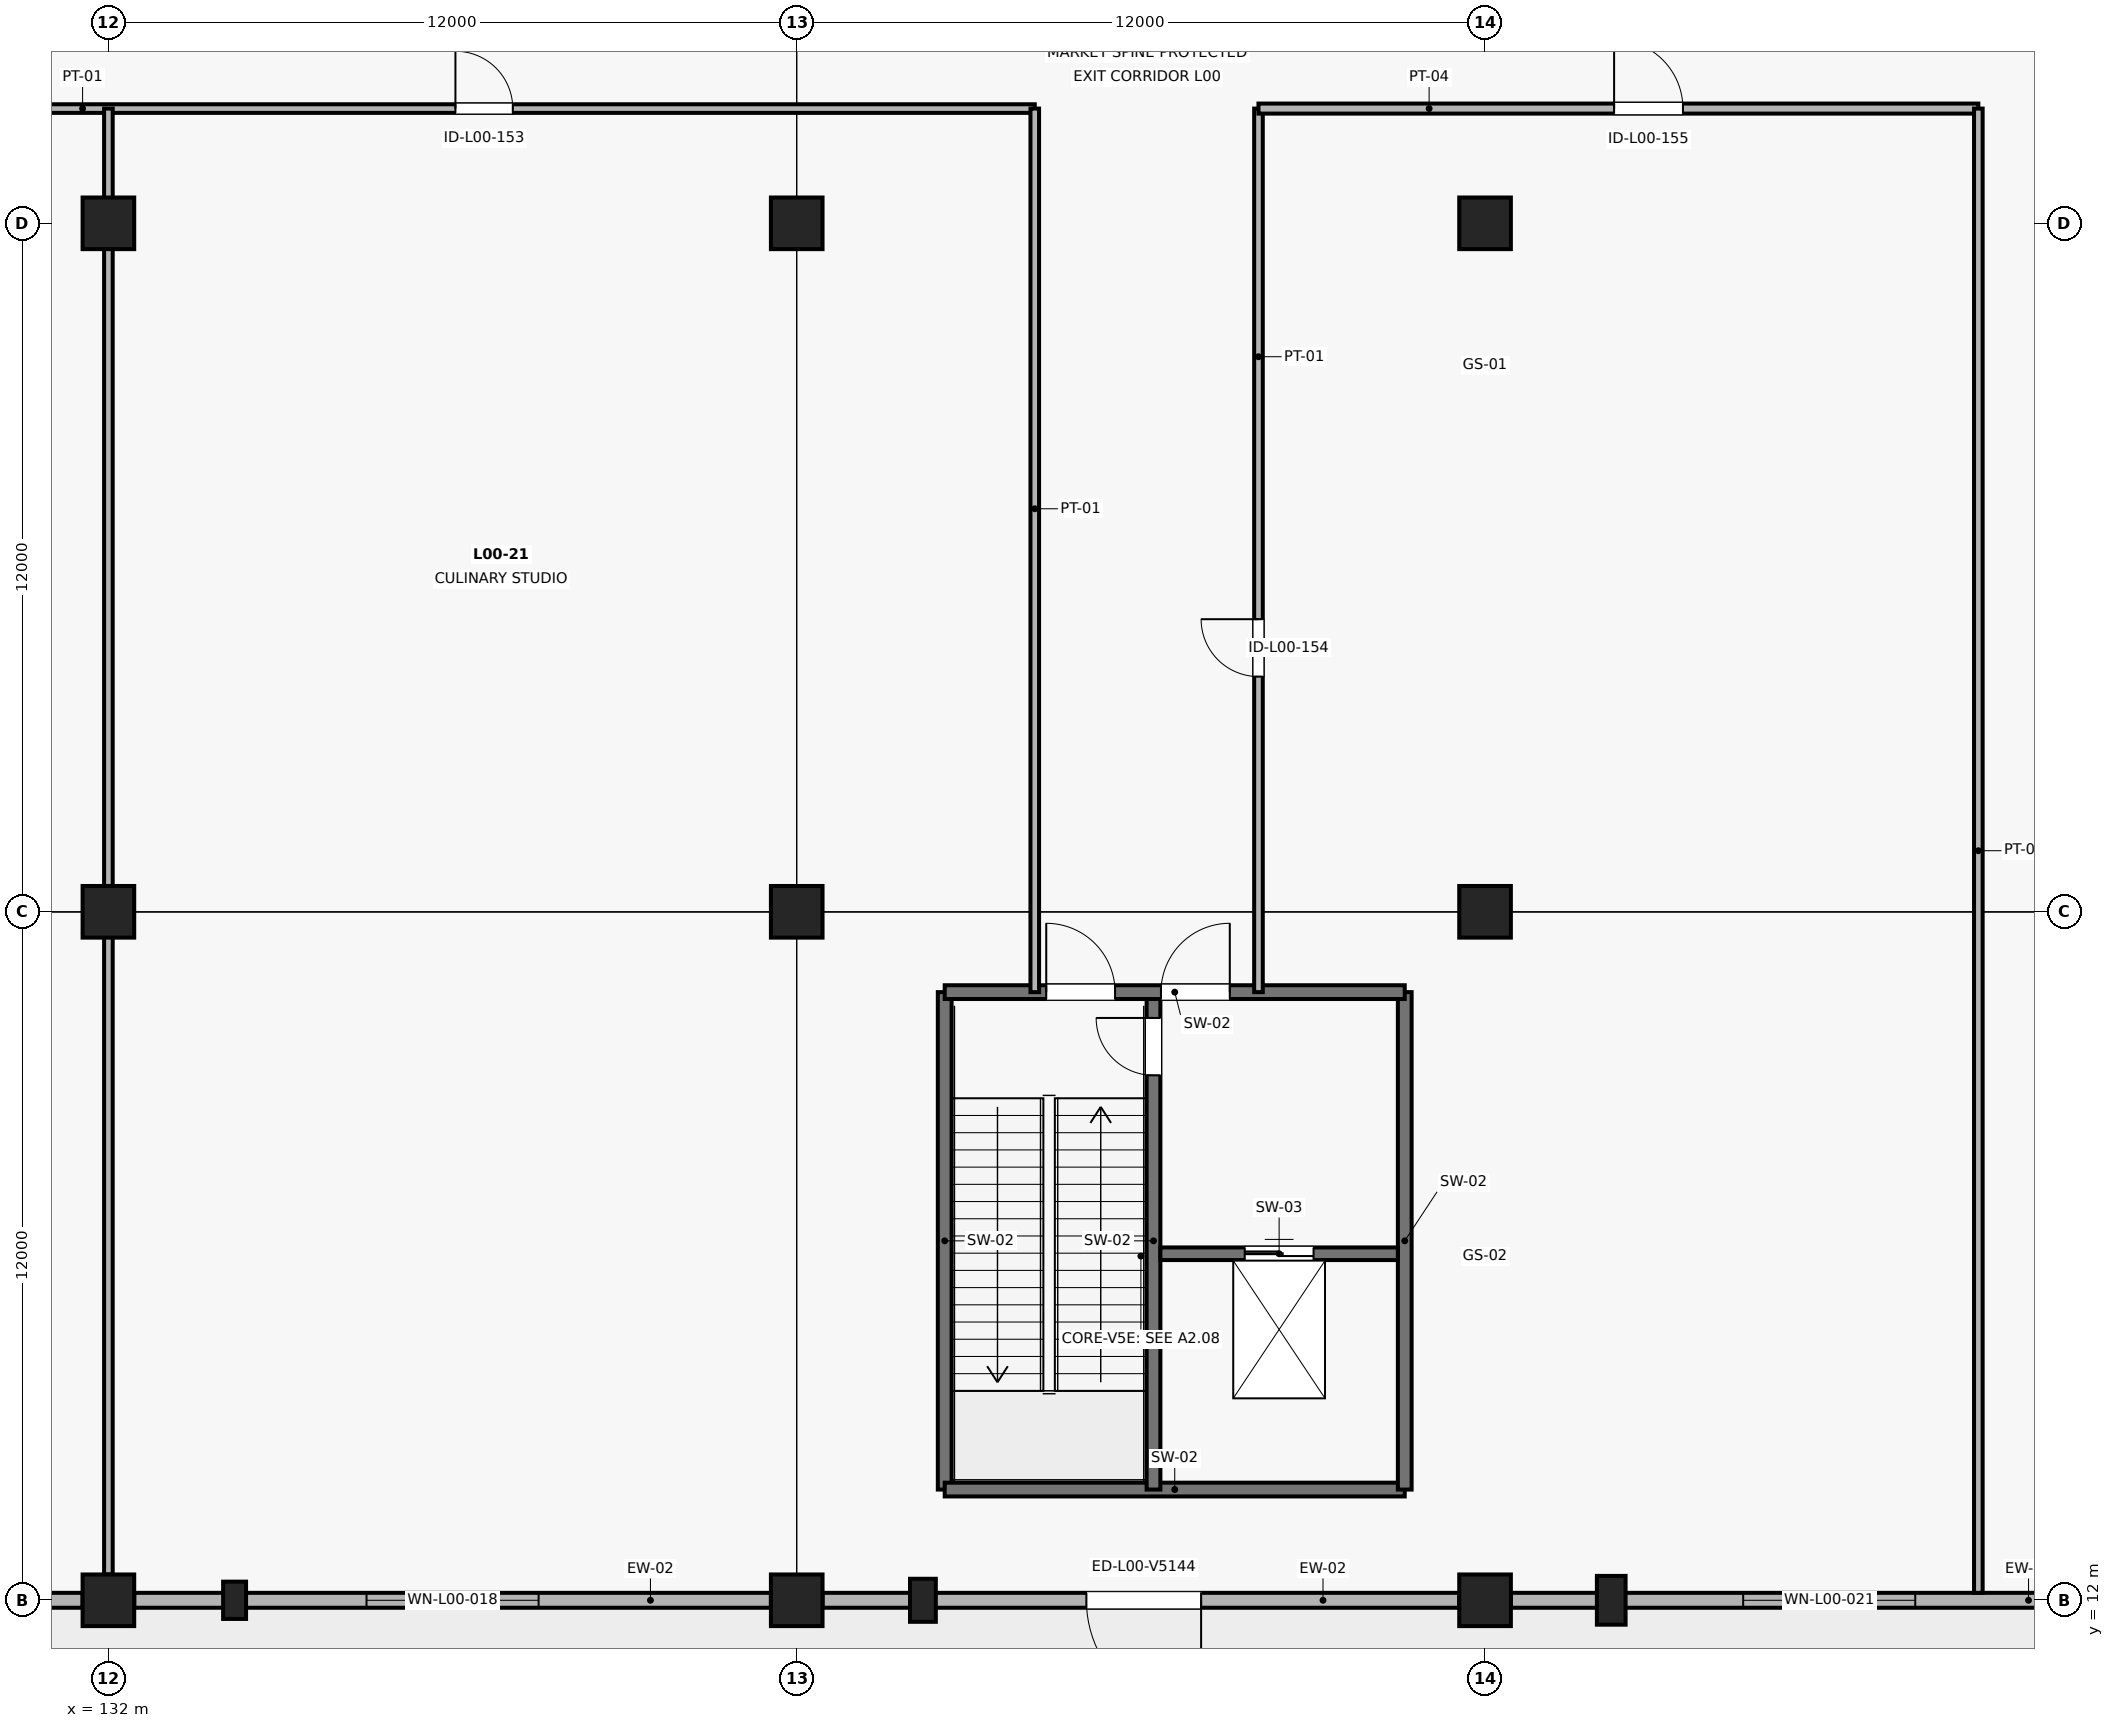
"""IFC4 building model, lengths in metres.
Left out: names, types, materials, properties, quantities, classifications, styles, units other than length and angle.
Written with IfcOpenShell. Run it as: python <this file> out.ifc"""

import sys

from ifc_helpers import new_model, si_unit, direction, frame, frame_2d, origin, origin_2d, place, context, subcontext, project, spatial, rectangle, extrude, element, fill, save


model = new_model("IFC4")
c1 = context("Model", 3, precision=1e-05, world=origin(), true_north=direction((0.0, 1.0)))
c2 = subcontext(c1, "Body", "Model", "MODEL_VIEW")
j1 = project(units=[si_unit("LENGTHUNIT", "METRE"), si_unit("PLANEANGLEUNIT", "RADIAN")], contexts=[c1])
p1 = place(None, origin())
s1 = spatial("IfcSite", under=j1, at=p1, CompositionType="ELEMENT")
p2 = place(p1, origin())
s2 = spatial("IfcBuilding", under=s1, at=p2, CompositionType="ELEMENT")
p3 = place(p2, origin())
s3 = spatial("IfcBuildingStorey", under=s2, at=p3, CompositionType="ELEMENT", Elevation=0.0)
for number, where, z_axis, x_axis in (
    (1, (132.0, 12.0, 0.0), (0.0, 0.0, 1.0), (1.0, 0.0, 0.0)),
    (2, (132.0, 24.0, 0.0), (0.0, 0.0, 1.0), (1.0, 0.0, 0.0)),
    (3, (132.0, 36.0, 0.0), (0.0, 0.0, 1.0), (1.0, 0.0, 0.0)),
):
    element("IfcColumn", number, at=place(p3, frame(where, z_axis=z_axis, x_axis=x_axis)), inside=s3, PredefinedType="COLUMN", context=c2, shape_type="SweptSolid", body=[
        extrude(rectangle(XDim=0.9, YDim=0.9, at=origin_2d()), origin(), (0.0, 0.0, 1.0), 6.6),
    ])
p4 = place(p3, frame((134.2, 12.0, 0.0), z_axis=(0.0, 0.0, 1.0), x_axis=(1.0, 0.0, 0.0)))
e4 = element("IfcColumn", 4, at=p4, inside=s3, PredefinedType="PILASTER", context=c2, shape_type="SweptSolid", body=[
    extrude(rectangle(XDim=0.4, YDim=0.65, at=origin_2d()), origin(), (0.0, 0.0, 1.0), 6.6),
])
for number, where, z_axis, x_axis in (
    (5, (144.0, 12.0, 0.0), (0.0, 0.0, 1.0), (1.0, 0.0, 0.0)),
    (6, (144.0, 24.0, 0.0), (0.0, 0.0, 1.0), (1.0, 0.0, 0.0)),
    (7, (144.0, 36.0, 0.0), (0.0, 0.0, 1.0), (1.0, 0.0, 0.0)),
):
    element("IfcColumn", number, at=place(p3, frame(where, z_axis=z_axis, x_axis=x_axis)), inside=s3, PredefinedType="COLUMN", context=c2, shape_type="SweptSolid", body=[
        extrude(rectangle(XDim=0.9, YDim=0.9, at=origin_2d()), origin(), (0.0, 0.0, 1.0), 6.6),
    ])
p5 = place(p3, frame((146.2, 12.0, 0.0), z_axis=(0.0, 0.0, 1.0), x_axis=(1.0, 0.0, 0.0)))
e8 = element("IfcColumn", 8, at=p5, inside=s3, PredefinedType="PILASTER", context=c2, shape_type="SweptSolid", body=[
    extrude(rectangle(XDim=0.45, YDim=0.75, at=origin_2d()), origin(), (0.0, 0.0, 1.0), 6.6),
])
for number, where, z_axis, x_axis in (
    (9, (156.0, 12.0, 0.0), (0.0, 0.0, 1.0), (1.0, 0.0, 0.0)),
    (10, (156.0, 24.0, 0.0), (0.0, 0.0, 1.0), (1.0, 0.0, 0.0)),
    (11, (156.0, 36.0, 0.0), (0.0, 0.0, 1.0), (1.0, 0.0, 0.0)),
):
    element("IfcColumn", number, at=place(p3, frame(where, z_axis=z_axis, x_axis=x_axis)), inside=s3, PredefinedType="COLUMN", context=c2, shape_type="SweptSolid", body=[
        extrude(rectangle(XDim=0.9, YDim=0.9, at=origin_2d()), origin(), (0.0, 0.0, 1.0), 6.6),
    ])
p6 = place(p3, frame((158.2, 12.0, 0.0), z_axis=(0.0, 0.0, 1.0), x_axis=(1.0, 0.0, 0.0)))
e12 = element("IfcColumn", 12, at=p6, inside=s3, PredefinedType="PILASTER", context=c2, shape_type="SweptSolid", body=[
    extrude(rectangle(XDim=0.5, YDim=0.85, at=origin_2d()), origin(), (0.0, 0.0, 1.0), 6.6),
])
p7 = place(p3, frame((131.55, 12.0, 0.0), z_axis=(0.0, 0.0, 1.0), x_axis=(-1.0, 0.0, 0.0)))
e13 = element("IfcWall", 13, at=p7, inside=s3, PredefinedType="SOLIDWALL", context=c2, shape_type="SweptSolid", body=[
    extrude(rectangle(XDim=11.1, YDim=0.26, at=frame_2d((5.55, 0.0))), origin(), (0.0, 0.0, 1.0), 5.128),
])
p8 = place(p7, frame((4.05, 0.0, 1.1)))
e14 = element("IfcOpeningElement", 14, at=p8, cuts=e13, PredefinedType="OPENING", context=c2, shape_type="SweptSolid", body=[
    extrude(rectangle(XDim=3.0, YDim=1.8, at=frame_2d((1.5, 0.9))), frame((0.0, 0.145, 0.0), z_axis=(0.0, -1.0, 0.0), x_axis=(1.0, 0.0, 0.0)), (0.0, 0.0, 1.0), 0.29),
])
p9 = place(p3, frame((143.55, 12.0, 0.0), z_axis=(0.0, 0.0, 1.0), x_axis=(-1.0, 0.0, 0.0)))
e15 = element("IfcWall", 15, at=p9, inside=s3, PredefinedType="SOLIDWALL", context=c2, shape_type="SweptSolid", body=[
    extrude(rectangle(XDim=11.1, YDim=0.26, at=frame_2d((5.55, 0.0))), origin(), (0.0, 0.0, 1.0), 5.278),
])
p10 = place(p9, frame((4.05, 0.0, 1.1)))
e16 = element("IfcOpeningElement", 16, at=p10, cuts=e15, PredefinedType="OPENING", context=c2, shape_type="SweptSolid", body=[
    extrude(rectangle(XDim=3.0, YDim=1.8, at=frame_2d((1.5, 0.9))), frame((0.0, 0.145, 0.0), z_axis=(0.0, -1.0, 0.0), x_axis=(1.0, 0.0, 0.0)), (0.0, 0.0, 1.0), 0.29),
])
p11 = place(p3, frame((155.55, 12.0, 0.0), z_axis=(0.0, 0.0, 1.0), x_axis=(-1.0, 0.0, 0.0)))
e17 = element("IfcWall", 17, at=p11, inside=s3, PredefinedType="SOLIDWALL", context=c2, shape_type="SweptSolid", body=[
    extrude(rectangle(XDim=11.1, YDim=0.26, at=frame_2d((5.55, 0.0))), origin(), (0.0, 0.0, 1.0), 5.268),
])
p12 = place(p11, frame((4.5, 0.0, 0.0)))
e18 = element("IfcOpeningElement", 18, at=p12, cuts=e17, PredefinedType="OPENING", context=c2, shape_type="SweptSolid", body=[
    extrude(rectangle(XDim=2.0, YDim=2.2, at=frame_2d((1.0, 1.1))), frame((0.0, 0.145, 0.0), z_axis=(0.0, -1.0, 0.0), x_axis=(1.0, 0.0, 0.0)), (0.0, 0.0, 1.0), 0.29),
])
p13 = place(p3, frame((167.6, 12.0, 0.0), z_axis=(0.0, 0.0, 1.0), x_axis=(-1.0, 0.0, 0.0)))
e19 = element("IfcWall", 19, at=p13, inside=s3, PredefinedType="SOLIDWALL", context=c2, shape_type="SweptSolid", body=[
    extrude(rectangle(XDim=11.15, YDim=0.26, at=frame_2d((5.575, 0.0))), origin(), (0.0, 0.0, 1.0), 5.268),
])
p14 = place(p13, frame((4.1, 0.0, 1.1)))
e20 = element("IfcOpeningElement", 20, at=p14, cuts=e19, PredefinedType="OPENING", context=c2, shape_type="SweptSolid", body=[
    extrude(rectangle(XDim=3.0, YDim=1.8, at=frame_2d((1.5, 0.9))), frame((0.0, 0.145, 0.0), z_axis=(0.0, -1.0, 0.0), x_axis=(1.0, 0.0, 0.0)), (0.0, 0.0, 1.0), 0.29),
])
p15 = place(p3, frame((146.58, 22.6, 0.0), z_axis=(0.0, 0.0, 1.0), x_axis=(0.0, -1.0, 0.0)))
e21 = element("IfcWall", 21, at=p15, inside=s3, PredefinedType="SHEAR", context=c2, shape_type="SweptSolid", body=[
    extrude(rectangle(XDim=8.67, YDim=0.24, at=frame_2d((4.335, 0.0))), origin(), (0.0, 0.0, 1.0), 6.29),
])
p16 = place(p3, frame((146.58, 13.93, 0.0), z_axis=(0.0, 0.0, 1.0), x_axis=(1.0, 0.0, 0.0)))
e22 = element("IfcWall", 22, at=p16, inside=s3, PredefinedType="SHEAR", context=c2, shape_type="SweptSolid", body=[
    extrude(rectangle(XDim=8.02, YDim=0.24, at=frame_2d((4.01, 0.0))), origin(), (0.0, 0.0, 1.0), 6.29),
])
p17 = place(p3, frame((150.22, 13.93, 0.0), z_axis=(0.0, 0.0, 1.0), x_axis=(0.0, 1.0, 0.0)))
e23 = element("IfcWall", 23, at=p17, inside=s3, PredefinedType="SHEAR", context=c2, shape_type="SweptSolid", body=[
    extrude(rectangle(XDim=8.67, YDim=0.24, at=frame_2d((4.335, 0.0))), origin(), (0.0, 0.0, 1.0), 6.29),
])
p18 = place(p17, frame((7.22, 0.0, 0.0)))
e24 = element("IfcOpeningElement", 24, at=p18, cuts=e23, PredefinedType="OPENING", context=c2, shape_type="SweptSolid", body=[
    extrude(rectangle(XDim=1.0, YDim=2.2, at=frame_2d((0.5, 1.1))), frame((0.0, 0.135, 0.0), z_axis=(0.0, -1.0, 0.0), x_axis=(1.0, 0.0, 0.0)), (0.0, 0.0, 1.0), 0.27),
])
p19 = place(p3, frame((154.6, 13.93, 0.0), z_axis=(0.0, 0.0, 1.0), x_axis=(0.0, 1.0, 0.0)))
e25 = element("IfcWall", 25, at=p19, inside=s3, PredefinedType="SHEAR", context=c2, shape_type="SweptSolid", body=[
    extrude(rectangle(XDim=8.67, YDim=0.24, at=frame_2d((4.335, 0.0))), origin(), (0.0, 0.0, 1.0), 6.29),
])
p20 = place(p3, frame((146.58, 22.6, 0.0), z_axis=(0.0, 0.0, 1.0), x_axis=(1.0, 0.0, 0.0)))
e26 = element("IfcWall", 26, at=p20, inside=s3, PredefinedType="SHEAR", context=c2, shape_type="SweptSolid", body=[
    extrude(rectangle(XDim=8.02, YDim=0.24, at=frame_2d((4.01, 0.0))), origin(), (0.0, 0.0, 1.0), 6.29),
])
p21 = place(p20, frame((1.77, 0.0, 0.0)))
e27 = element("IfcOpeningElement", 27, at=p21, cuts=e26, PredefinedType="OPENING", context=c2, shape_type="SweptSolid", body=[
    extrude(rectangle(XDim=1.2, YDim=2.2, at=frame_2d((0.6, 1.1))), frame((0.0, 0.135, 0.0), z_axis=(0.0, -1.0, 0.0), x_axis=(1.0, 0.0, 0.0)), (0.0, 0.0, 1.0), 0.27),
])
p22 = place(p20, frame((3.77, 0.0, 0.0)))
e28 = element("IfcOpeningElement", 28, at=p22, cuts=e26, PredefinedType="OPENING", context=c2, shape_type="SweptSolid", body=[
    extrude(rectangle(XDim=1.2, YDim=2.2, at=frame_2d((0.6, 1.1))), frame((0.0, 0.135, 0.0), z_axis=(0.0, -1.0, 0.0), x_axis=(1.0, 0.0, 0.0)), (0.0, 0.0, 1.0), 0.27),
])
p23 = place(p3, frame((150.34, 18.04, 0.0), z_axis=(0.0, 0.0, 1.0), x_axis=(1.0, 0.0, 0.0)))
e29 = element("IfcWall", 29, at=p23, inside=s3, PredefinedType="SHEAR", context=c2, shape_type="SweptSolid", body=[
    extrude(rectangle(XDim=4.14, YDim=0.22, at=frame_2d((2.07, 0.0))), origin(), (0.0, 0.0, 1.0), 6.29),
])
p24 = place(p23, frame((1.47, 0.0, 0.0)))
e30 = element("IfcOpeningElement", 30, at=p24, cuts=e29, PredefinedType="OPENING", context=c2, shape_type="SweptSolid", body=[
    extrude(rectangle(XDim=1.2, YDim=2.2, at=frame_2d((0.6, 1.1))), frame((0.0, 0.125, 0.0), z_axis=(0.0, -1.0, 0.0), x_axis=(1.0, 0.0, 0.0)), (0.0, 0.0, 1.0), 0.25),
])
p25 = place(p3, frame((116.05, 38.0, 0.0), z_axis=(0.0, 0.0, 1.0), x_axis=(1.0, 0.0, 0.0)))
e31 = element("IfcWall", 31, at=p25, inside=s3, PredefinedType="PARTITIONING", context=c2, shape_type="SweptSolid", body=[
    extrude(rectangle(XDim=32.1, YDim=0.15, at=frame_2d((16.05, 0.0))), origin(), (0.0, 0.0, 1.0), 5.013),
])
p26 = place(p25, frame((8.0, 0.0, 0.0)))
e32 = element("IfcOpeningElement", 32, at=p26, cuts=e31, PredefinedType="OPENING", context=c2, shape_type="SweptSolid", body=[
    extrude(rectangle(XDim=1.0, YDim=2.2, at=frame_2d((0.5, 1.1))), frame((0.0, 0.09, 0.0), z_axis=(0.0, -1.0, 0.0), x_axis=(1.0, 0.0, 0.0)), (0.0, 0.0, 1.0), 0.18),
])
p27 = place(p25, frame((22.0, 0.0, 0.0)))
e33 = element("IfcOpeningElement", 33, at=p27, cuts=e31, PredefinedType="OPENING", context=c2, shape_type="SweptSolid", body=[
    extrude(rectangle(XDim=1.0, YDim=2.2, at=frame_2d((0.5, 1.1))), frame((0.0, 0.09, 0.0), z_axis=(0.0, -1.0, 0.0), x_axis=(1.0, 0.0, 0.0)), (0.0, 0.0, 1.0), 0.18),
])
p28 = place(p3, frame((148.15, 22.6, 0.0), z_axis=(0.0, 0.0, 1.0), x_axis=(0.0, 1.0, 0.0)))
e34 = element("IfcWall", 34, at=p28, inside=s3, PredefinedType="PARTITIONING", context=c2, shape_type="SweptSolid", body=[
    extrude(rectangle(XDim=15.4, YDim=0.15, at=frame_2d((7.7, 0.0))), origin(), (0.0, 0.0, 1.0), 5.243),
])
p29 = place(p3, frame((152.05, 22.6, 0.0), z_axis=(0.0, 0.0, 1.0), x_axis=(0.0, 1.0, 0.0)))
e35 = element("IfcWall", 35, at=p29, inside=s3, PredefinedType="PARTITIONING", context=c2, shape_type="SweptSolid", body=[
    extrude(rectangle(XDim=15.4, YDim=0.15, at=frame_2d((7.7, 0.0))), origin(), (0.0, 0.0, 1.0), 5.243),
])
p30 = place(p29, frame((5.5, 0.0, 0.0)))
e36 = element("IfcOpeningElement", 36, at=p30, cuts=e35, PredefinedType="OPENING", context=c2, shape_type="SweptSolid", body=[
    extrude(rectangle(XDim=1.0, YDim=2.2, at=frame_2d((0.5, 1.1))), frame((0.0, 0.09, 0.0), z_axis=(0.0, -1.0, 0.0), x_axis=(1.0, 0.0, 0.0)), (0.0, 0.0, 1.0), 0.18),
])
p31 = place(p3, frame((152.05, 38.0, 0.0), z_axis=(0.0, 0.0, 1.0), x_axis=(1.0, 0.0, 0.0)))
e37 = element("IfcWall", 37, at=p31, inside=s3, PredefinedType="PARTITIONING", context=c2, shape_type="SweptSolid", body=[
    extrude(rectangle(XDim=12.55, YDim=0.175, at=frame_2d((6.275, 0.0))), origin(), (0.0, 0.0, 1.0), 5.393),
])
p32 = place(p31, frame((6.2, 0.0, 0.0)))
e38 = element("IfcOpeningElement", 38, at=p32, cuts=e37, PredefinedType="OPENING", context=c2, shape_type="SweptSolid", body=[
    extrude(rectangle(XDim=1.2, YDim=2.2, at=frame_2d((0.6, 1.1))), frame((0.0, 0.103, 0.0), z_axis=(0.0, -1.0, 0.0), x_axis=(1.0, 0.0, 0.0)), (0.0, 0.0, 1.0), 0.205),
])
p33 = place(p3, frame((164.6, 12.13, 0.0), z_axis=(0.0, 0.0, 1.0), x_axis=(0.0, 1.0, 0.0)))
e39 = element("IfcWall", 39, at=p33, inside=s3, PredefinedType="PARTITIONING", context=c2, shape_type="SweptSolid", body=[
    extrude(rectangle(XDim=25.87, YDim=0.15, at=frame_2d((12.935, 0.0))), origin(), (0.0, 0.0, 1.0), 5.293),
])
p34 = place(p3, frame((132.0, 12.45, 0.0), z_axis=(0.0, 0.0, 1.0), x_axis=(0.0, 1.0, 0.0)))
e40 = element("IfcWall", 40, at=p34, inside=s3, PredefinedType="PARTITIONING", context=c2, shape_type="SweptSolid", body=[
    extrude(rectangle(XDim=25.55, YDim=0.15, at=frame_2d((12.775, 0.0))), origin(), (0.0, 0.0, 1.0), 5.013),
])
p35 = place(p10, origin())
e41 = element("IfcWindow", 41, at=p35, inside=s3, PartitioningType="SINGLE_PANEL", PredefinedType="WINDOW", context=c2, shape_type="SweptSolid", body=[
    extrude(rectangle(XDim=3.0, YDim=1.8, at=frame_2d((1.5, 0.9))), frame((0.0, 0.03, 0.0), z_axis=(0.0, -1.0, 0.0), x_axis=(1.0, 0.0, 0.0)), (0.0, 0.0, 1.0), 0.06),
])
fill(e16, e41)
p36 = place(p12, origin())
e42 = element("IfcDoor", 42, at=p36, inside=s3, OperationType="SINGLE_SWING_LEFT", PredefinedType="DOOR", context=c2, shape_type="SweptSolid", body=[
    extrude(rectangle(XDim=2.0, YDim=2.2, at=frame_2d((1.0, 1.1))), frame((0.0, 0.025, 0.0), z_axis=(0.0, -1.0, 0.0), x_axis=(1.0, 0.0, 0.0)), (0.0, 0.0, 1.0), 0.05),
])
fill(e18, e42)
p37 = place(p14, origin())
e43 = element("IfcWindow", 43, at=p37, inside=s3, PartitioningType="SINGLE_PANEL", PredefinedType="WINDOW", context=c2, shape_type="SweptSolid", body=[
    extrude(rectangle(XDim=3.0, YDim=1.8, at=frame_2d((1.5, 0.9))), frame((0.0, 0.03, 0.0), z_axis=(0.0, -1.0, 0.0), x_axis=(1.0, 0.0, 0.0)), (0.0, 0.0, 1.0), 0.06),
])
fill(e20, e43)
p38 = place(p21, origin())
e44 = element("IfcDoor", 44, at=p38, inside=s3, OperationType="SINGLE_SWING_LEFT", PredefinedType="DOOR", context=c2, shape_type="SweptSolid", body=[
    extrude(rectangle(XDim=1.2, YDim=2.2, at=frame_2d((0.6, 1.1))), frame((0.0, 0.025, 0.0), z_axis=(0.0, -1.0, 0.0), x_axis=(1.0, 0.0, 0.0)), (0.0, 0.0, 1.0), 0.05),
])
fill(e27, e44)
p39 = place(p22, origin())
e45 = element("IfcDoor", 45, at=p39, inside=s3, OperationType="SINGLE_SWING_RIGHT", PredefinedType="DOOR", context=c2, shape_type="SweptSolid", body=[
    extrude(rectangle(XDim=1.2, YDim=2.2, at=frame_2d((0.6, 1.1))), frame((0.0, 0.025, 0.0), z_axis=(0.0, -1.0, 0.0), x_axis=(1.0, 0.0, 0.0)), (0.0, 0.0, 1.0), 0.05),
])
fill(e28, e45)
p40 = place(p18, origin())
e46 = element("IfcDoor", 46, at=p40, inside=s3, OperationType="SINGLE_SWING_RIGHT", PredefinedType="DOOR", context=c2, shape_type="SweptSolid", body=[
    extrude(rectangle(XDim=1.0, YDim=2.2, at=frame_2d((0.5, 1.1))), frame((0.0, 0.025, 0.0), z_axis=(0.0, -1.0, 0.0), x_axis=(1.0, 0.0, 0.0)), (0.0, 0.0, 1.0), 0.05),
])
fill(e24, e46)
p41 = place(p24, origin())
e47 = element("IfcDoor", 47, at=p41, inside=s3, OperationType="DOUBLE_DOOR_SLIDING", PredefinedType="DOOR", context=c2, shape_type="SweptSolid", body=[
    extrude(rectangle(XDim=1.2, YDim=2.2, at=frame_2d((0.6, 1.1))), frame((0.0, 0.025, 0.0), z_axis=(0.0, -1.0, 0.0), x_axis=(1.0, 0.0, 0.0)), (0.0, 0.0, 1.0), 0.05),
])
fill(e30, e47)
p42 = place(p27, origin())
e48 = element("IfcDoor", 48, at=p42, inside=s3, OperationType="SINGLE_SWING_LEFT", PredefinedType="DOOR", context=c2, shape_type="SweptSolid", body=[
    extrude(rectangle(XDim=1.0, YDim=2.2, at=frame_2d((0.5, 1.1))), frame((0.0, 0.025, 0.0), z_axis=(0.0, -1.0, 0.0), x_axis=(1.0, 0.0, 0.0)), (0.0, 0.0, 1.0), 0.05),
])
fill(e33, e48)
p43 = place(p30, origin())
e49 = element("IfcDoor", 49, at=p43, inside=s3, OperationType="SINGLE_SWING_RIGHT", PredefinedType="DOOR", context=c2, shape_type="SweptSolid", body=[
    extrude(rectangle(XDim=1.0, YDim=2.2, at=frame_2d((0.5, 1.1))), frame((0.0, 0.025, 0.0), z_axis=(0.0, -1.0, 0.0), x_axis=(1.0, 0.0, 0.0)), (0.0, 0.0, 1.0), 0.05),
])
fill(e36, e49)
p44 = place(p32, origin())
e50 = element("IfcDoor", 50, at=p44, inside=s3, OperationType="SINGLE_SWING_LEFT", PredefinedType="DOOR", context=c2, shape_type="SweptSolid", body=[
    extrude(rectangle(XDim=1.2, YDim=2.2, at=frame_2d((0.6, 1.1))), frame((0.0, 0.025, 0.0), z_axis=(0.0, -1.0, 0.0), x_axis=(1.0, 0.0, 0.0)), (0.0, 0.0, 1.0), 0.05),
])
fill(e38, e50)
save(model, sys.argv[1])
